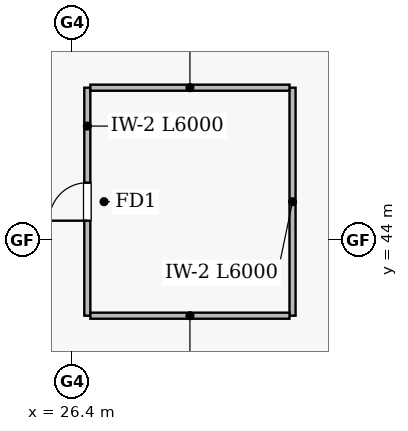
"""IFC4 building model, lengths in metres.
Left out: names, types, materials, properties, quantities, classifications, styles, units other than length and angle.
Written with IfcOpenShell. Run it as: python <this file> out.ifc"""

import sys

from ifc_helpers import new_model, si_unit, direction, frame, frame_2d, origin, place, context, subcontext, project, spatial, rectangle, extrude, element, fill, save


model = new_model("IFC4")
c1 = context("Model", 3, precision=1e-05, world=origin(), true_north=direction((0.0, 1.0)))
c2 = subcontext(c1, "Body", "Model", "MODEL_VIEW")
j1 = project(units=[si_unit("LENGTHUNIT", "METRE"), si_unit("PLANEANGLEUNIT", "RADIAN")], contexts=[c1])
p1 = place(None, origin())
s1 = spatial("IfcSite", under=j1, at=p1, CompositionType="ELEMENT")
p2 = place(p1, origin())
s2 = spatial("IfcBuilding", under=s1, at=p2, CompositionType="ELEMENT")
p3 = place(p2, frame((0.0, 0.0, -11.7)))
s3 = spatial("IfcBuildingStorey", under=s2, at=p3, CompositionType="ELEMENT", Elevation=-11.7)
p4 = place(p3, frame((26.8, 42.0, 0.0), z_axis=(0.0, 0.0, 1.0), x_axis=(0.0, 1.0, 0.0)))
e1 = element("IfcWall", 1, at=p4, inside=s3, PredefinedType="SOLIDWALL", context=c2, shape_type="SweptSolid", body=[
    extrude(rectangle(XDim=6.0, YDim=0.16, at=frame_2d((3.0, 0.0))), origin(), (0.0, 0.0, 1.0), 3.58),
])
p5 = place(p4, frame((2.5, 0.0, 0.0)))
e2 = element("IfcOpeningElement", 2, at=p5, cuts=e1, PredefinedType="OPENING", context=c2, shape_type="SweptSolid", body=[
    extrude(rectangle(XDim=1.0, YDim=2.15, at=frame_2d((0.5, 1.075))), frame((0.0, 0.09, 0.0), z_axis=(0.0, -1.0, 0.0), x_axis=(1.0, 0.0, 0.0)), (0.0, 0.0, 1.0), 0.18),
])
p6 = place(p3, frame((32.2, 48.0, 0.0), z_axis=(0.0, 0.0, 1.0), x_axis=(0.0, -1.0, 0.0)))
e3 = element("IfcWall", 3, at=p6, inside=s3, PredefinedType="SOLIDWALL", context=c2, shape_type="SweptSolid", body=[
    extrude(rectangle(XDim=6.0, YDim=0.16, at=frame_2d((3.0, 0.0))), origin(), (0.0, 0.0, 1.0), 3.268),
])
for number, where, z_axis, x_axis in (
    (4, (26.88, 48.0, 0.0), (0.0, 0.0, 1.0), (1.0, 0.0, 0.0)),
    (5, (32.12, 42.0, 0.0), (0.0, 0.0, 1.0), (-1.0, 0.0, 0.0)),
):
    element("IfcWall", number, at=place(p3, frame(where, z_axis=z_axis, x_axis=x_axis)), inside=s3, PredefinedType="SOLIDWALL", context=c2, shape_type="SweptSolid", body=[
        extrude(rectangle(XDim=5.24, YDim=0.16, at=frame_2d((2.62, 0.0))), origin(), (0.0, 0.0, 1.0), 2.768),
    ])
p7 = place(p5, origin())
e6 = element("IfcDoor", 6, at=p7, inside=s3, OperationType="SINGLE_SWING_LEFT", PredefinedType="DOOR", context=c2, shape_type="SweptSolid", body=[
    extrude(rectangle(XDim=1.0, YDim=2.15, at=frame_2d((0.5, 1.075))), frame((0.0, 0.025, 0.0), z_axis=(0.0, -1.0, 0.0), x_axis=(1.0, 0.0, 0.0)), (0.0, 0.0, 1.0), 0.05),
])
fill(e2, e6)
save(model, sys.argv[1])
